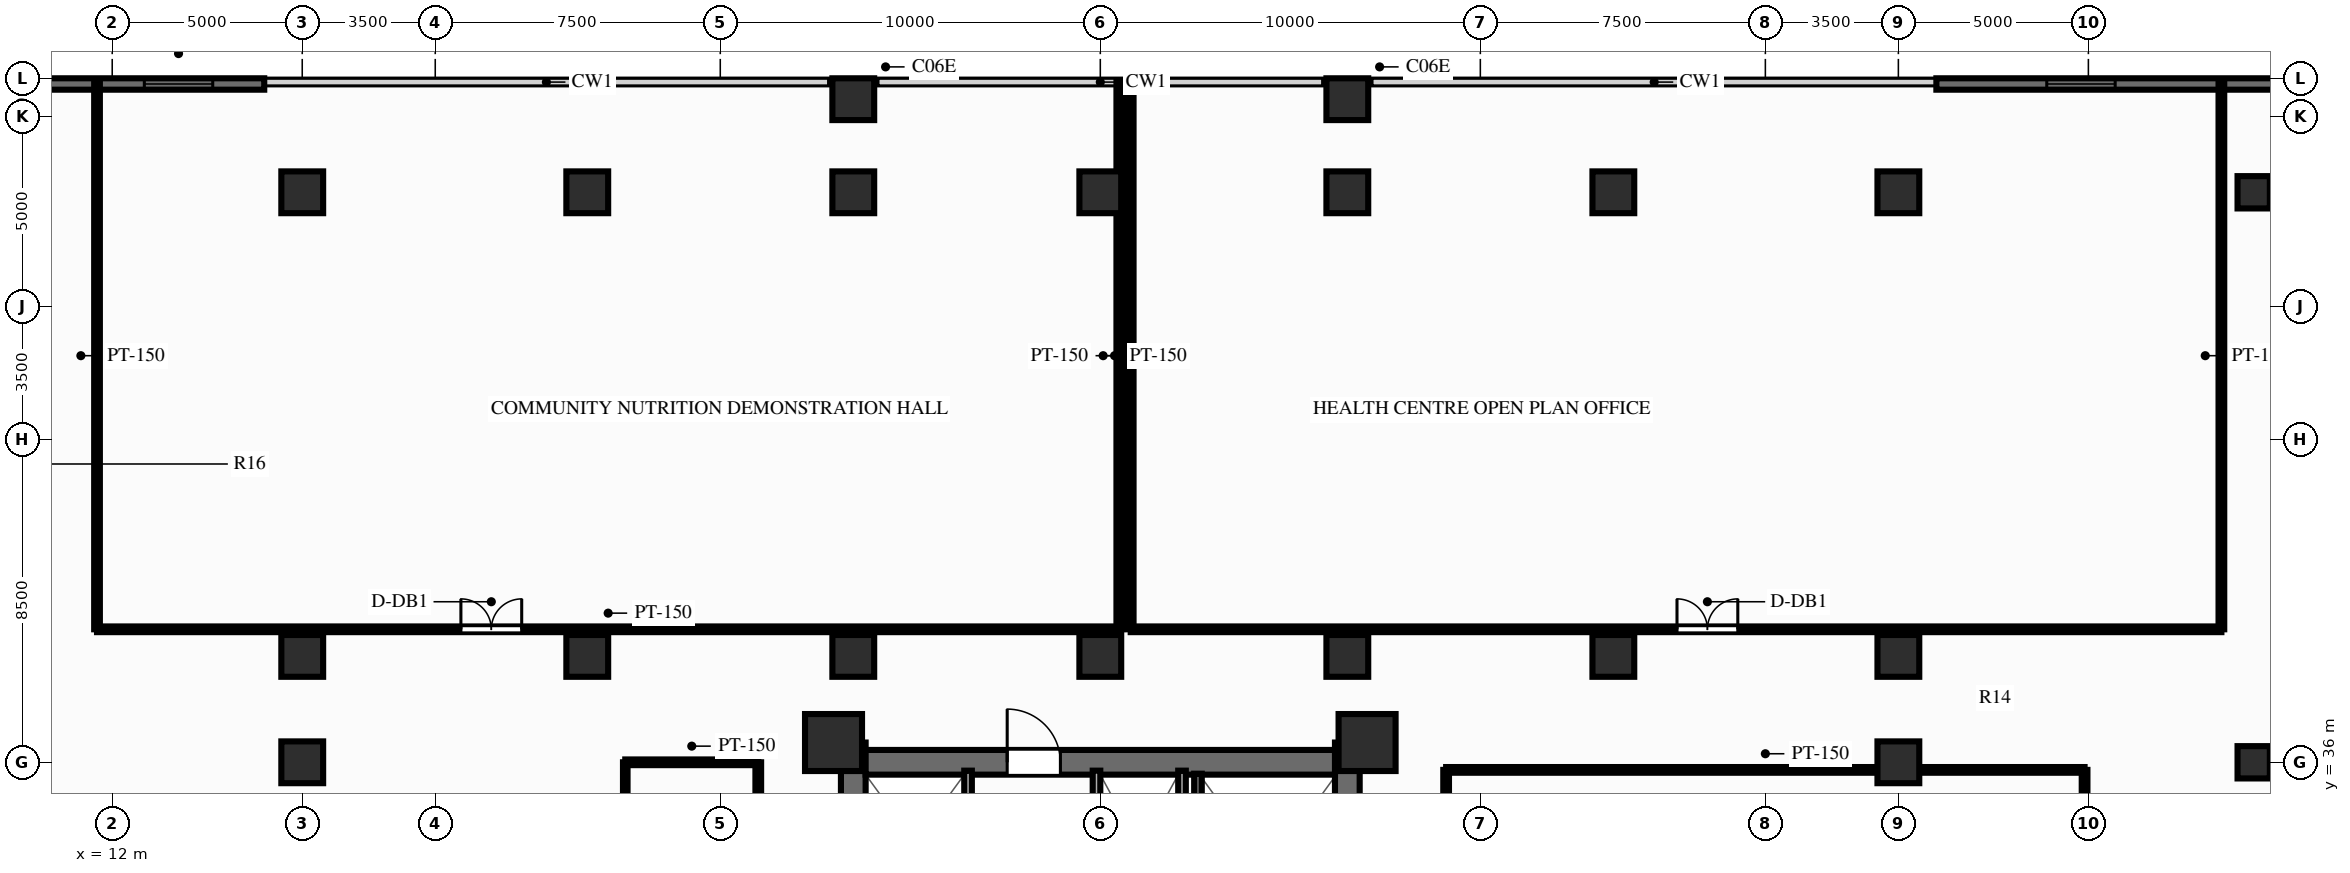
"""IFC4 building model, lengths in metres.
Left out: names, types, materials, properties, quantities, classifications, styles, units other than length and angle.
Written with IfcOpenShell. Run it as: python <this file> out.ifc"""

import sys

from ifc_helpers import new_model, si_unit, direction, frame, frame_2d, origin, origin_2d, place, context, subcontext, project, spatial, rectangle, circle, extrude, source, transform, mapped, element, fill, save


model = new_model("IFC4")
c1 = context("Model", 3, precision=1e-05, world=origin(), true_north=direction((0.0, 1.0)))
c2 = subcontext(c1, "Body", "Model", "MODEL_VIEW")
j1 = project(units=[si_unit("LENGTHUNIT", "METRE"), si_unit("PLANEANGLEUNIT", "RADIAN")], contexts=[c1])
p1 = place(None, origin())
s1 = spatial("IfcSite", under=j1, at=p1, CompositionType="ELEMENT")
p2 = place(p1, origin())
s2 = spatial("IfcBuilding", under=s1, at=p2, CompositionType="ELEMENT")
p3 = place(p2, frame((0.0, 0.0, 15.0)))
s3 = spatial("IfcBuildingStorey", under=s2, at=p3, CompositionType="ELEMENT", Elevation=15.0)
p4 = place(p3, frame((31.5, 17.48, 0.0), z_axis=(0.0, 0.0, 1.0), x_axis=(0.0, 1.0, 0.0)))
e1 = element("IfcWall", 1, at=p4, inside=s3, PredefinedType="SHEAR", context=c2, shape_type="SweptSolid", body=[
    extrude(rectangle(XDim=19.04, YDim=0.65, at=frame_2d((9.52, 0.0))), origin(), (0.0, 0.0, 1.0), 4.4),
])
p5 = place(p4, frame((6.32, 0.0, 0.0)))
e2 = element("IfcOpeningElement", 2, at=p5, cuts=e1, PredefinedType="OPENING", context=c2, shape_type="SweptSolid", body=[
    extrude(rectangle(XDim=1.1, YDim=2.15, at=frame_2d((0.55, 1.075))), frame((0.0, 0.337, 0.0), z_axis=(0.0, -1.0, 0.0), x_axis=(1.0, 0.0, 0.0)), (0.0, 0.0, 1.0), 0.674),
])
p6 = place(p3, frame((44.5, 17.48, 0.0), z_axis=(0.0, 0.0, 1.0), x_axis=(0.0, 1.0, 0.0)))
e3 = element("IfcWall", 3, at=p6, inside=s3, PredefinedType="SHEAR", context=c2, shape_type="SweptSolid", body=[
    extrude(rectangle(XDim=19.04, YDim=0.65, at=frame_2d((9.52, 0.0))), origin(), (0.0, 0.0, 1.0), 4.4),
])
p7 = place(p6, frame((12.67, 0.0, 0.0), z_axis=(0.0, 0.0, 1.0), x_axis=(-1.0, 0.0, 0.0)))
e4 = element("IfcOpeningElement", 4, at=p7, cuts=e3, PredefinedType="OPENING", context=c2, shape_type="SweptSolid", body=[
    extrude(rectangle(XDim=1.1, YDim=2.15, at=frame_2d((0.55, 1.075))), frame((0.0, 0.337, 0.0), z_axis=(0.0, -1.0, 0.0), x_axis=(1.0, 0.0, 0.0)), (0.0, 0.0, 1.0), 0.674),
])
p8 = place(p3, frame((31.825, 36.0, 0.0), z_axis=(0.0, 0.0, 1.0), x_axis=(1.0, 0.0, 0.0)))
e5 = element("IfcWall", 5, at=p8, inside=s3, PredefinedType="SHEAR", context=c2, shape_type="SweptSolid", body=[
    extrude(rectangle(XDim=12.35, YDim=0.65, at=frame_2d((6.175, 0.0))), origin(), (0.0, 0.0, 1.0), 4.4),
])
p9 = place(p8, frame((5.125, 0.0, 0.0), z_axis=(0.0, 0.0, 1.0), x_axis=(-1.0, 0.0, 0.0)))
e6 = element("IfcOpeningElement", 6, at=p9, cuts=e5, PredefinedType="OPENING", context=c2, shape_type="SweptSolid", body=[
    extrude(rectangle(XDim=1.4, YDim=2.15, at=frame_2d((0.7, 1.075))), frame((0.0, 0.337, 0.0), z_axis=(0.0, -1.0, 0.0), x_axis=(1.0, 0.0, 0.0)), (0.0, 0.0, 1.0), 0.674),
])
m1 = source(origin(), c2, "Body", "SweptSolid", [
    extrude(rectangle(XDim=1.5, YDim=1.5, at=origin_2d()), origin(), (0.0, 0.0, 1.0), 4.4),
])
for number, where, z_axis, x_axis in (
    (7, (30.98, 36.52, 0.0), (0.0, 0.0, 1.0), (1.0, 0.0, 0.0)),
    (8, (45.02, 36.52, 0.0), (0.0, 0.0, 1.0), (1.0, 0.0, 0.0)),
):
    element("IfcColumn", number, at=place(p3, frame(where, z_axis=z_axis, x_axis=x_axis)), inside=s3, PredefinedType="COLUMN", context=c2, shape_type="MappedRepresentation", body=[
        mapped(m1, transform((0.0, 0.0, 0.0), scale=1.0)),
    ])
m2 = source(origin(), c2, "Body", "SweptSolid", [
    extrude(circle(Radius=0.425, at=origin_2d()), origin(), (0.0, 0.0, 1.0), 4.4),
])
for number, where, z_axis, x_axis in (
    (9, (68.35, 36.0, 0.0), (0.0, 0.0, 1.0), (1.0, 0.0, 0.0)),
    (10, (68.35, 51.0, 0.0), (0.0, 0.0, 1.0), (1.0, 0.0, 0.0)),
):
    element("IfcColumn", number, at=place(p3, frame(where, z_axis=z_axis, x_axis=x_axis)), inside=s3, PredefinedType="COLUMN", context=c2, shape_type="MappedRepresentation", body=[
        mapped(m2, transform((0.0, 0.0, 0.0), scale=1.0)),
    ])
m3 = source(origin(), c2, "Body", "SweptSolid", [
    extrude(rectangle(XDim=1.1, YDim=1.1, at=origin_2d()), origin(), (0.0, 0.0, 1.0), 4.4),
])
for number, where, z_axis, x_axis in (
    (11, (17.0, 36.0, 0.0), (0.0, 0.0, 1.0), (1.0, 0.0, 0.0)),
    (12, (59.0, 36.0, 0.0), (0.0, 0.0, 1.0), (1.0, 0.0, 0.0)),
    (13, (17.0, 38.8, 0.0), (0.0, 0.0, 1.0), (1.0, 0.0, 0.0)),
    (14, (59.0, 38.8, 0.0), (0.0, 0.0, 1.0), (1.0, 0.0, 0.0)),
    (15, (17.0, 51.0, 0.0), (0.0, 0.0, 1.0), (1.0, 0.0, 0.0)),
    (16, (59.0, 51.0, 0.0), (0.0, 0.0, 1.0), (1.0, 0.0, 0.0)),
    (17, (24.5, 38.8, 0.0), (0.0, 0.0, 1.0), (1.0, 0.0, 0.0)),
    (18, (24.5, 51.0, 0.0), (0.0, 0.0, 1.0), (1.0, 0.0, 0.0)),
    (19, (31.5, 38.8, 0.0), (0.0, 0.0, 1.0), (1.0, 0.0, 0.0)),
    (20, (31.5, 51.0, 0.0), (0.0, 0.0, 1.0), (1.0, 0.0, 0.0)),
    (21, (31.5, 53.45, 0.0), (0.0, 0.0, 1.0), (1.0, 0.0, 0.0)),
    (22, (38.0, 38.8, 0.0), (0.0, 0.0, 1.0), (1.0, 0.0, 0.0)),
    (23, (38.0, 51.0, 0.0), (0.0, 0.0, 1.0), (1.0, 0.0, 0.0)),
    (24, (44.5, 38.8, 0.0), (0.0, 0.0, 1.0), (1.0, 0.0, 0.0)),
    (25, (44.5, 51.0, 0.0), (0.0, 0.0, 1.0), (1.0, 0.0, 0.0)),
    (26, (44.5, 53.45, 0.0), (0.0, 0.0, 1.0), (1.0, 0.0, 0.0)),
    (27, (51.5, 38.8, 0.0), (0.0, 0.0, 1.0), (1.0, 0.0, 0.0)),
    (28, (51.5, 51.0, 0.0), (0.0, 0.0, 1.0), (1.0, 0.0, 0.0)),
):
    element("IfcColumn", number, at=place(p3, frame(where, z_axis=z_axis, x_axis=x_axis)), inside=s3, PredefinedType="COLUMN", context=c2, shape_type="MappedRepresentation", body=[
        mapped(m3, transform((0.0, 0.0, 0.0), scale=1.0)),
    ])
p10 = place(p3, frame((0.0, 53.85, 0.0), z_axis=(0.0, 0.0, 1.0), x_axis=(1.0, 0.0, 0.0)))
e29 = element("IfcWall", 29, at=p10, inside=s3, PredefinedType="SOLIDWALL", context=c2, shape_type="SweptSolid", body=[
    extrude(rectangle(XDim=16.0, YDim=0.3, at=frame_2d((8.0, 0.0))), origin(), (0.0, 0.0, 1.0), 2.98),
])
p11 = place(p10, frame((4.955, 0.0, 0.85)))
e30 = element("IfcOpeningElement", 30, at=p11, cuts=e29, PredefinedType="OPENING", context=c2, shape_type="SweptSolid", body=[
    extrude(rectangle(XDim=1.8, YDim=1.65, at=frame_2d((0.9, 0.825))), frame((0.0, 0.162, 0.0), z_axis=(0.0, -1.0, 0.0), x_axis=(1.0, 0.0, 0.0)), (0.0, 0.0, 1.0), 0.324),
])
p12 = place(p10, frame((12.845, 0.0, 0.85)))
e31 = element("IfcOpeningElement", 31, at=p12, cuts=e29, PredefinedType="OPENING", context=c2, shape_type="SweptSolid", body=[
    extrude(rectangle(XDim=1.8, YDim=1.65, at=frame_2d((0.9, 0.825))), frame((0.0, 0.162, 0.0), z_axis=(0.0, -1.0, 0.0), x_axis=(1.0, 0.0, 0.0)), (0.0, 0.0, 1.0), 0.324),
])
p13 = place(p3, frame((60.0, 53.85, 0.0), z_axis=(0.0, 0.0, 1.0), x_axis=(1.0, 0.0, 0.0)))
e32 = element("IfcWall", 32, at=p13, inside=s3, PredefinedType="SOLIDWALL", context=c2, shape_type="SweptSolid", body=[
    extrude(rectangle(XDim=16.0, YDim=0.3, at=frame_2d((8.0, 0.0))), origin(), (0.0, 0.0, 1.0), 2.98),
])
p14 = place(p13, frame((2.905, 0.0, 0.85)))
e33 = element("IfcOpeningElement", 33, at=p14, cuts=e32, PredefinedType="OPENING", context=c2, shape_type="SweptSolid", body=[
    extrude(rectangle(XDim=1.8, YDim=1.65, at=frame_2d((0.9, 0.825))), frame((0.0, 0.162, 0.0), z_axis=(0.0, -1.0, 0.0), x_axis=(1.0, 0.0, 0.0)), (0.0, 0.0, 1.0), 0.324),
])
p15 = place(p13, frame((10.795, 0.0, 0.85)))
e34 = element("IfcOpeningElement", 34, at=p15, cuts=e32, PredefinedType="OPENING", context=c2, shape_type="SweptSolid", body=[
    extrude(rectangle(XDim=1.8, YDim=1.65, at=frame_2d((0.9, 0.825))), frame((0.0, 0.162, 0.0), z_axis=(0.0, -1.0, 0.0), x_axis=(1.0, 0.0, 0.0)), (0.0, 0.0, 1.0), 0.324),
])
p16 = place(p3, frame((40.15, 31.8, 0.0), z_axis=(0.0, 0.0, 1.0), x_axis=(0.0, 1.0, 0.0)))
e35 = element("IfcWall", 35, at=p16, inside=s3, PredefinedType="PARTITIONING", context=c2, shape_type="SweptSolid", body=[
    extrude(rectangle(XDim=3.98, YDim=0.2, at=frame_2d((1.99, 0.0))), origin(), (0.0, 0.0, 1.0), 4.08),
])
p17 = place(p3, frame((40.57, 28.65, 0.0), z_axis=(0.0, 0.0, 1.0), x_axis=(0.0, 1.0, 0.0)))
e36 = element("IfcWall", 36, at=p17, inside=s3, PredefinedType="SOLIDWALL", context=c2, shape_type="SweptSolid", body=[
    extrude(rectangle(XDim=7.05, YDim=0.2, at=frame_2d((3.525, 0.0))), origin(), (0.0, 0.0, 1.0), 4.19),
])
p18 = place(p3, frame((34.52, 25.44, 0.0), z_axis=(0.0, 0.0, 1.0), x_axis=(0.0, 1.0, 0.0)))
e37 = element("IfcWall", 37, at=p18, inside=s3, PredefinedType="PARTITIONING", context=c2, shape_type="SweptSolid", body=[
    extrude(rectangle(XDim=10.34, YDim=0.2, at=frame_2d((5.17, 0.0))), origin(), (0.0, 0.0, 1.0), 4.08),
])
p19 = place(p18, frame((0.32, 0.0, 0.0)))
e38 = element("IfcOpeningElement", 38, at=p19, cuts=e37, PredefinedType="OPENING", context=c2, shape_type="SweptSolid", body=[
    extrude(rectangle(XDim=1.0, YDim=2.15, at=frame_2d((0.5, 1.075))), frame((0.0, 0.112, 0.0), z_axis=(0.0, -1.0, 0.0), x_axis=(1.0, 0.0, 0.0)), (0.0, 0.0, 1.0), 0.224),
])
p20 = place(p18, frame((1.71, 0.0, 0.0)))
e39 = element("IfcOpeningElement", 39, at=p20, cuts=e37, PredefinedType="OPENING", context=c2, shape_type="SweptSolid", body=[
    extrude(rectangle(XDim=1.0, YDim=2.15, at=frame_2d((0.5, 1.075))), frame((0.0, 0.112, 0.0), z_axis=(0.0, -1.0, 0.0), x_axis=(1.0, 0.0, 0.0)), (0.0, 0.0, 1.0), 0.224),
])
p21 = place(p18, frame((3.535, 0.0, 0.0)))
e40 = element("IfcOpeningElement", 40, at=p21, cuts=e37, PredefinedType="OPENING", context=c2, shape_type="SweptSolid", body=[
    extrude(rectangle(XDim=1.0, YDim=2.15, at=frame_2d((0.5, 1.075))), frame((0.0, 0.112, 0.0), z_axis=(0.0, -1.0, 0.0), x_axis=(1.0, 0.0, 0.0)), (0.0, 0.0, 1.0), 0.224),
])
p22 = place(p18, frame((5.135, 0.0, 0.0)))
e41 = element("IfcOpeningElement", 41, at=p22, cuts=e37, PredefinedType="OPENING", context=c2, shape_type="SweptSolid", body=[
    extrude(rectangle(XDim=1.0, YDim=2.15, at=frame_2d((0.5, 1.075))), frame((0.0, 0.112, 0.0), z_axis=(0.0, -1.0, 0.0), x_axis=(1.0, 0.0, 0.0)), (0.0, 0.0, 1.0), 0.224),
])
p23 = place(p3, frame((37.9, 25.44, 0.0), z_axis=(0.0, 0.0, 1.0), x_axis=(0.0, 1.0, 0.0)))
e42 = element("IfcWall", 42, at=p23, inside=s3, PredefinedType="PARTITIONING", context=c2, shape_type="SweptSolid", body=[
    extrude(rectangle(XDim=10.34, YDim=0.2, at=frame_2d((5.17, 0.0))), origin(), (0.0, 0.0, 1.0), 4.08),
])
p24 = place(p3, frame((25.5, 18.0, 0.0), z_axis=(0.0, 0.0, 1.0), x_axis=(0.0, 1.0, 0.0)))
e43 = element("IfcWall", 43, at=p24, inside=s3, PredefinedType="PARTITIONING", context=c2, shape_type="SweptSolid", body=[
    extrude(rectangle(XDim=18.0, YDim=0.12, at=frame_2d((9.0, 0.0))), origin(), (0.0, 0.0, 1.0), 4.08),
])
p25 = place(p3, frame((29.0, 29.7, 0.0), z_axis=(0.0, 0.0, 1.0), x_axis=(0.0, 1.0, 0.0)))
e44 = element("IfcWall", 44, at=p25, inside=s3, PredefinedType="PARTITIONING", context=c2, shape_type="SweptSolid", body=[
    extrude(rectangle(XDim=6.3, YDim=0.15, at=frame_2d((3.15, 0.0))), origin(), (0.0, 0.0, 1.0), 4.08),
])
p26 = place(p25, frame((2.75, 0.0, 0.0)))
e45 = element("IfcOpeningElement", 45, at=p26, cuts=e44, PredefinedType="OPENING", context=c2, shape_type="SweptSolid", body=[
    extrude(rectangle(XDim=0.8, YDim=2.05, at=frame_2d((0.4, 1.025))), frame((0.0, 0.087, 0.0), z_axis=(0.0, -1.0, 0.0), x_axis=(1.0, 0.0, 0.0)), (0.0, 0.0, 1.0), 0.174),
])
p27 = place(p3, frame((25.5, 36.0, 0.0), z_axis=(0.0, 0.0, 1.0), x_axis=(1.0, 0.0, 0.0)))
e46 = element("IfcWall", 46, at=p27, inside=s3, PredefinedType="PARTITIONING", context=c2, shape_type="SweptSolid", body=[
    extrude(rectangle(XDim=3.5, YDim=0.15, at=frame_2d((1.75, 0.0))), origin(), (0.0, 0.0, 1.0), 2.94),
])
p28 = place(p3, frame((11.6, 39.5, 0.0), z_axis=(0.0, 0.0, 1.0), x_axis=(1.0, 0.0, 0.0)))
e47 = element("IfcWall", 47, at=p28, inside=s3, PredefinedType="PARTITIONING", context=c2, shape_type="SweptSolid", body=[
    extrude(rectangle(XDim=26.9, YDim=0.15, at=frame_2d((13.45, 0.0))), origin(), (0.0, 0.0, 1.0), 4.08),
])
p29 = place(p28, frame((9.575, 0.0, 0.0)))
e48 = element("IfcOpeningElement", 48, at=p29, cuts=e47, PredefinedType="OPENING", context=c2, shape_type="SweptSolid", body=[
    extrude(rectangle(XDim=1.6, YDim=2.15, at=frame_2d((0.8, 1.075))), frame((0.0, 0.087, 0.0), z_axis=(0.0, -1.0, 0.0), x_axis=(1.0, 0.0, 0.0)), (0.0, 0.0, 1.0), 0.174),
])
p30 = place(p3, frame((11.6, 39.5, 0.0), z_axis=(0.0, 0.0, 1.0), x_axis=(0.0, 1.0, 0.0)))
e49 = element("IfcWall", 49, at=p30, inside=s3, PredefinedType="PARTITIONING", context=c2, shape_type="SweptSolid", body=[
    extrude(rectangle(XDim=14.4, YDim=0.15, at=frame_2d((7.2, 0.0))), origin(), (0.0, 0.0, 1.0), 2.94),
])
p31 = place(p3, frame((38.5, 39.5, 0.0), z_axis=(0.0, 0.0, 1.0), x_axis=(0.0, 1.0, 0.0)))
e50 = element("IfcWall", 50, at=p31, inside=s3, PredefinedType="PARTITIONING", context=c2, shape_type="SweptSolid", body=[
    extrude(rectangle(XDim=14.4, YDim=0.15, at=frame_2d((7.2, 0.0))), origin(), (0.0, 0.0, 1.0), 4.08),
])
p32 = place(p3, frame((38.8, 39.5, 0.0), z_axis=(0.0, 0.0, 1.0), x_axis=(1.0, 0.0, 0.0)))
e51 = element("IfcWall", 51, at=p32, inside=s3, PredefinedType="PARTITIONING", context=c2, shape_type="SweptSolid", body=[
    extrude(rectangle(XDim=28.7, YDim=0.15, at=frame_2d((14.35, 0.0))), origin(), (0.0, 0.0, 1.0), 4.08),
])
p33 = place(p32, frame((14.375, 0.0, 0.0)))
e52 = element("IfcOpeningElement", 52, at=p33, cuts=e51, PredefinedType="OPENING", context=c2, shape_type="SweptSolid", body=[
    extrude(rectangle(XDim=1.6, YDim=2.15, at=frame_2d((0.8, 1.075))), frame((0.0, 0.087, 0.0), z_axis=(0.0, -1.0, 0.0), x_axis=(1.0, 0.0, 0.0)), (0.0, 0.0, 1.0), 0.174),
])
for number, where, z_axis, x_axis in (
    (53, (38.8, 39.5, 0.0), (0.0, 0.0, 1.0), (0.0, 1.0, 0.0)),
    (54, (67.5, 39.5, 0.0), (0.0, 0.0, 1.0), (0.0, 1.0, 0.0)),
):
    element("IfcWall", number, at=place(p3, frame(where, z_axis=z_axis, x_axis=x_axis)), inside=s3, PredefinedType="PARTITIONING", context=c2, shape_type="SweptSolid", body=[
        extrude(rectangle(XDim=14.4, YDim=0.15, at=frame_2d((7.2, 0.0))), origin(), (0.0, 0.0, 1.0), 4.08),
    ])
p34 = place(p3, frame((47.1, 35.8, 0.0), z_axis=(0.0, 0.0, 1.0), x_axis=(1.0, 0.0, 0.0)))
e55 = element("IfcWall", 55, at=p34, inside=s3, PredefinedType="PARTITIONING", context=c2, shape_type="SweptSolid", body=[
    extrude(rectangle(XDim=16.8, YDim=0.15, at=frame_2d((8.4, 0.0))), origin(), (0.0, 0.0, 1.0), 4.08),
])
p35 = place(p3, frame((47.1, 18.2, 0.0), z_axis=(0.0, 0.0, 1.0), x_axis=(0.0, 1.0, 0.0)))
e56 = element("IfcWall", 56, at=p35, inside=s3, PredefinedType="PARTITIONING", context=c2, shape_type="SweptSolid", body=[
    extrude(rectangle(XDim=17.6, YDim=0.15, at=frame_2d((8.8, 0.0))), origin(), (0.0, 0.0, 1.0), 4.08),
])
p36 = place(p3, frame((63.9, 18.2, 0.0), z_axis=(0.0, 0.0, 1.0), x_axis=(0.0, 1.0, 0.0)))
e57 = element("IfcWall", 57, at=p36, inside=s3, PredefinedType="PARTITIONING", context=c2, shape_type="SweptSolid", body=[
    extrude(rectangle(XDim=17.6, YDim=0.15, at=frame_2d((8.8, 0.0))), origin(), (0.0, 0.0, 1.0), 4.08),
])
p37 = place(p36, frame((7.756, 0.0, 0.0)))
e58 = element("IfcOpeningElement", 58, at=p37, cuts=e57, PredefinedType="OPENING", context=c2, shape_type="SweptSolid", body=[
    extrude(rectangle(XDim=1.1, YDim=2.15, at=frame_2d((0.55, 1.075))), frame((0.0, 0.087, 0.0), z_axis=(0.0, -1.0, 0.0), x_axis=(1.0, 0.0, 0.0)), (0.0, 0.0, 1.0), 0.174),
])
m4 = source(origin(), c2, "Body", "SweptSolid", [
    extrude(rectangle(XDim=1.8, YDim=1.65, at=frame_2d((0.9, 0.825))), frame((0.0, 0.03, 0.0), z_axis=(0.0, -1.0, 0.0), x_axis=(1.0, 0.0, 0.0)), (0.0, 0.0, 1.0), 0.06),
])
p38 = place(p12, origin())
e59 = element("IfcWindow", 59, at=p38, inside=s3, PartitioningType="SINGLE_PANEL", PredefinedType="WINDOW", context=c2, shape_type="MappedRepresentation", body=[
    mapped(m4, transform((0.0, 0.0, 0.0), scale=1.0)),
])
fill(e31, e59)
p39 = place(p14, origin())
e60 = element("IfcWindow", 60, at=p39, inside=s3, PartitioningType="SINGLE_PANEL", PredefinedType="WINDOW", context=c2, shape_type="MappedRepresentation", body=[
    mapped(m4, transform((0.0, 0.0, 0.0), scale=1.0)),
])
fill(e33, e60)
m5 = source(origin(), c2, "Body", "SweptSolid", [
    extrude(rectangle(XDim=1.4, YDim=2.15, at=frame_2d((0.7, 1.075))), frame((0.0, 0.025, 0.0), z_axis=(0.0, -1.0, 0.0), x_axis=(1.0, 0.0, 0.0)), (0.0, 0.0, 1.0), 0.05),
])
p40 = place(p9, origin())
e61 = element("IfcDoor", 61, at=p40, inside=s3, OperationType="SINGLE_SWING_RIGHT", PredefinedType="DOOR", context=c2, shape_type="MappedRepresentation", body=[
    mapped(m5, transform((0.0, 0.0, 0.0), scale=1.0)),
])
fill(e6, e61)
m6 = source(origin(), c2, "Body", "SweptSolid", [
    extrude(rectangle(XDim=1.6, YDim=2.15, at=frame_2d((0.8, 1.075))), frame((0.0, 0.025, 0.0), z_axis=(0.0, -1.0, 0.0), x_axis=(1.0, 0.0, 0.0)), (0.0, 0.0, 1.0), 0.05),
])
p41 = place(p29, origin())
e62 = element("IfcDoor", 62, at=p41, inside=s3, OperationType="DOUBLE_SWING_LEFT", PredefinedType="DOOR", context=c2, shape_type="MappedRepresentation", body=[
    mapped(m6, transform((0.0, 0.0, 0.0), scale=1.0)),
])
fill(e48, e62)
p42 = place(p33, origin())
e63 = element("IfcDoor", 63, at=p42, inside=s3, OperationType="DOUBLE_SWING_LEFT", PredefinedType="DOOR", context=c2, shape_type="MappedRepresentation", body=[
    mapped(m6, transform((0.0, 0.0, 0.0), scale=1.0)),
])
fill(e52, e63)
save(model, sys.argv[1])
